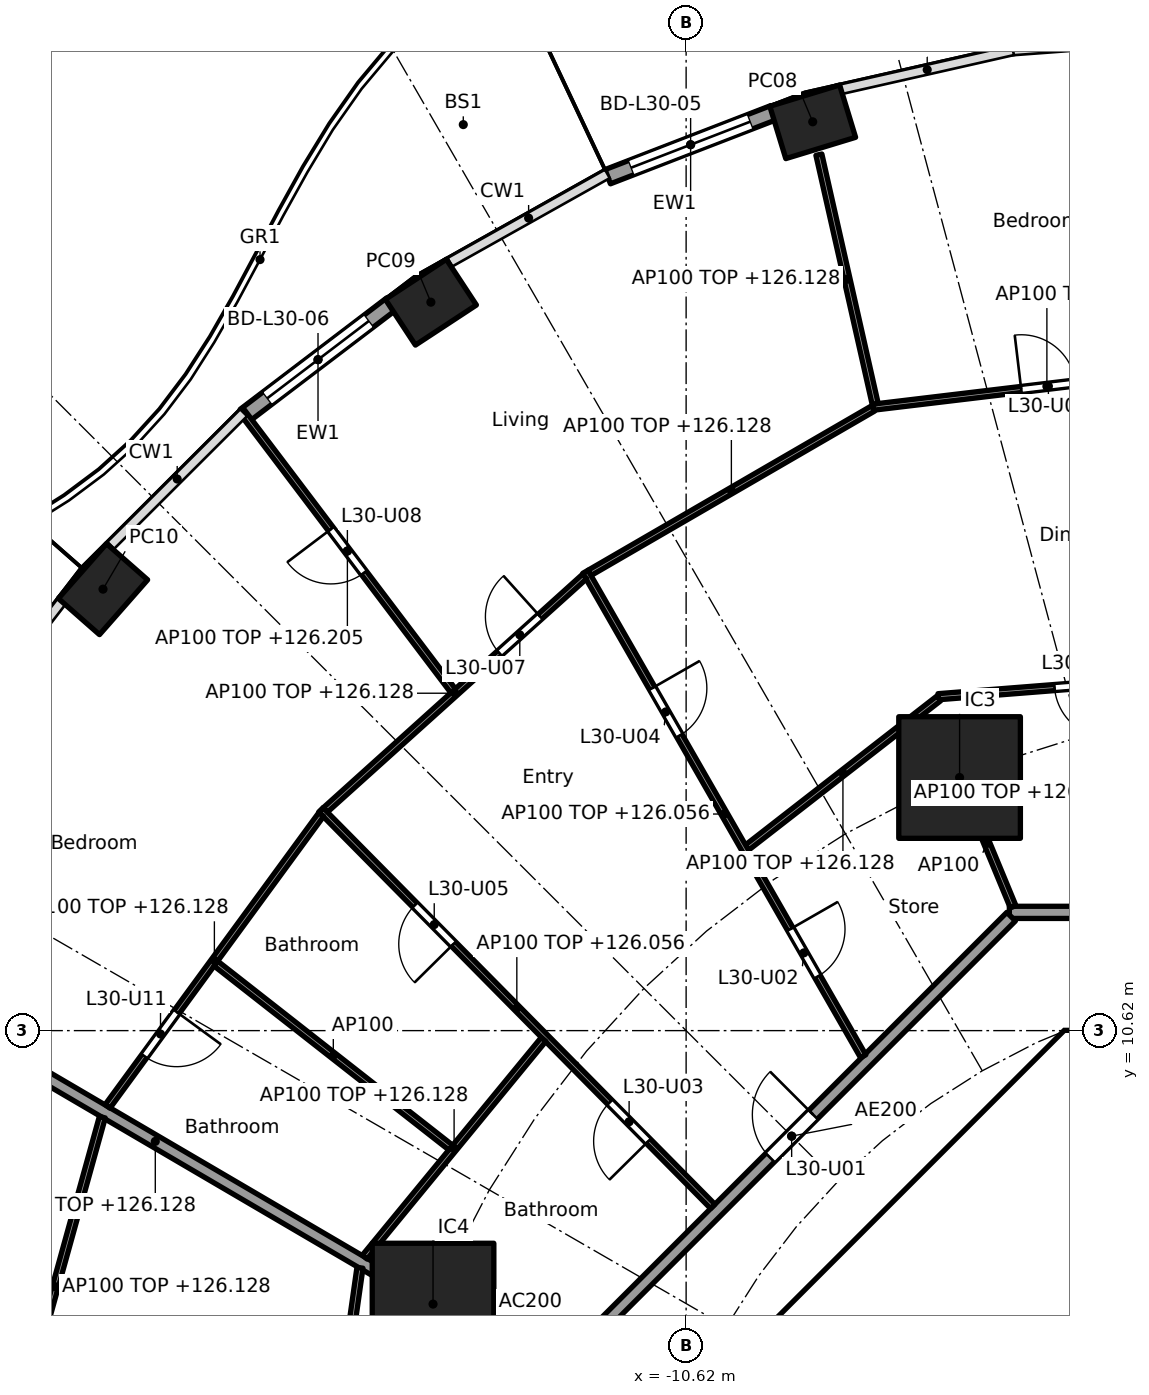
"""IFC4 building model, lengths in metres.
Left out: names, types, materials, properties, quantities, classifications, styles, units other than length and angle.
Written with IfcOpenShell. Run it as: python <this file> out.ifc"""

import sys

from ifc_helpers import new_model, si_unit, direction, frame, frame_2d, origin, origin_2d, place, context, subcontext, project, spatial, polyline, rectangle, hollow_rectangle, outline, extrude, element, fill, save


model = new_model("IFC4")
c1 = context("Model", 3, precision=1e-05, world=origin(), true_north=direction((0.0, 1.0)))
c2 = subcontext(c1, "Body", "Model", "MODEL_VIEW")
j1 = project(units=[si_unit("LENGTHUNIT", "METRE"), si_unit("PLANEANGLEUNIT", "RADIAN")], contexts=[c1])
p1 = place(None, origin())
s1 = spatial("IfcSite", under=j1, at=p1, CompositionType="ELEMENT")
p2 = place(p1, origin())
s2 = spatial("IfcBuilding", under=s1, at=p2, CompositionType="ELEMENT")
p3 = place(p2, frame((0.0, 0.0, 123.3)))
s3 = spatial("IfcBuildingStorey", under=s2, at=p3, CompositionType="ELEMENT", Elevation=123.3)
for number, where, z_axis, x_axis in (
    (1, (-8.538, 25.565, 0.0), (0.0, 0.0, 1.0), (-0.957, -0.292, 0.0)),
    (2, (-14.817, 22.599, 0.0), (0.0, 0.0, 1.0), (-0.836, -0.549, 0.0)),
    (3, (-20.209, 17.88, 0.0), (0.0, 0.0, 1.0), (-0.66, -0.751, 0.0)),
):
    element("IfcColumn", number, at=place(p3, frame(where, z_axis=z_axis, x_axis=x_axis)), inside=s3, PredefinedType="COLUMN", context=c2, shape_type="SweptSolid", body=[
        extrude(hollow_rectangle(XDim=1.2, YDim=0.9, WallThickness=0.04, at=origin_2d()), origin(), (0.0, 0.0, 1.0), 3.7),
    ])
for number, where, z_axis, x_axis in (
    (4, (-6.123, 14.782, 0.0), (0.0, 0.0, 1.0), (1.0, 0.0, 0.0)),
    (5, (-14.782, 6.123, 0.0), (0.0, 0.0, 1.0), (1.0, 0.0, 0.0)),
):
    element("IfcColumn", number, at=place(p3, frame(where, z_axis=z_axis, x_axis=x_axis)), inside=s3, PredefinedType="COLUMN", context=c2, shape_type="SweptSolid", body=[
        extrude(rectangle(XDim=2.0, YDim=2.0, at=origin_2d()), origin(), (0.0, 0.0, 1.0), 3.7),
    ])
p4 = place(p3, frame((-11.909, 24.662, 0.0), z_axis=(0.0, 0.0, 1.0), x_axis=(0.932845344347, 0.360277064952, 0.0)))
e6 = element("IfcWall", 6, at=p4, inside=s3, PredefinedType="SOLIDWALL", context=c2, shape_type="SweptSolid", body=[
    extrude(rectangle(XDim=2.923, YDim=0.25, at=frame_2d((1.462, 0.0))), origin(), (0.0, 0.0, 1.0), 3.44),
])
p5 = place(p4, frame((0.412, 0.0, 0.0)))
e7 = element("IfcOpeningElement", 7, at=p5, cuts=e6, PredefinedType="OPENING", context=c2, shape_type="SweptSolid", body=[
    extrude(rectangle(XDim=2.1, YDim=2.4, at=frame_2d((1.05, 1.2))), frame((0.0, 0.135, 0.0), z_axis=(0.0, -1.0, 0.0), x_axis=(1.0, 0.0, 0.0)), (0.0, 0.0, 1.0), 0.27),
])
p6 = place(p3, frame((-17.878, 20.738, 0.0), z_axis=(0.0, 0.0, 1.0), x_axis=(0.796022231079, 0.605267385233, 0.0)))
e8 = element("IfcWall", 8, at=p6, inside=s3, PredefinedType="SOLIDWALL", context=c2, shape_type="SweptSolid", body=[
    extrude(rectangle(XDim=3.026, YDim=0.25, at=frame_2d((1.513, 0.0))), origin(), (0.0, 0.0, 1.0), 3.44),
])
p7 = place(p6, frame((0.463, 0.0, 0.0)))
e9 = element("IfcOpeningElement", 9, at=p7, cuts=e8, PredefinedType="OPENING", context=c2, shape_type="SweptSolid", body=[
    extrude(rectangle(XDim=2.1, YDim=2.4, at=frame_2d((1.05, 1.2))), frame((0.0, 0.135, 0.0), z_axis=(0.0, -1.0, 0.0), x_axis=(1.0, 0.0, 0.0)), (0.0, 0.0, 1.0), 0.27),
])
p8 = place(p3, frame((-4.613, 9.988, 0.0), z_axis=(0.0, 0.0, 1.0), x_axis=(-0.707106781187, -0.707106781187, 0.0)))
e10 = element("IfcWall", 10, at=p8, inside=s3, PredefinedType="SHEAR", context=c2, shape_type="SweptSolid", body=[
    extrude(rectangle(XDim=7.602, YDim=0.6, at=frame_2d((3.801, 0.0))), origin(), (0.0, 0.0, 1.0), 3.44),
])
p9 = place(p8, frame((0.351, 0.0, 0.0)))
e11 = element("IfcOpeningElement", 11, at=p9, cuts=e10, PredefinedType="OPENING", context=c2, shape_type="SweptSolid", body=[
    extrude(rectangle(XDim=1.1, YDim=2.1, at=frame_2d((0.55, 1.05))), frame((0.0, 0.31, 0.0), z_axis=(0.0, -1.0, 0.0), x_axis=(1.0, 0.0, 0.0)), (0.0, 0.0, 1.0), 0.62),
])
p10 = place(p3, frame((-5.8, 4.3, 0.0), z_axis=(0.0, 0.0, 1.0), x_axis=(0.0, 1.0, 0.0)))
e12 = element("IfcWall", 12, at=p10, inside=s3, PredefinedType="PARTITIONING", context=c2, shape_type="SweptSolid", body=[
    extrude(rectangle(XDim=3.927, YDim=0.15, at=frame_2d((1.963, 0.0))), origin(), (0.0, 0.0, 1.0), 3.44),
])
p11 = place(p10, frame((1.551, 0.0, 0.0)))
e13 = element("IfcOpeningElement", 13, at=p11, cuts=e12, PredefinedType="OPENING", context=c2, shape_type="SweptSolid", body=[
    extrude(rectangle(XDim=0.9, YDim=2.1, at=frame_2d((0.45, 1.05))), frame((0.0, 0.085, 0.0), z_axis=(0.0, -1.0, 0.0), x_axis=(1.0, 0.0, 0.0)), (0.0, 0.0, 1.0), 0.17),
])
p12 = place(p3, origin())
e14 = element("IfcWall", 14, at=p12, inside=s3, PredefinedType="SHEAR", context=c2, shape_type="SweptSolid", body=[
    extrude(outline(polyline([(-4.152, 10.025), (-4.401, 9.776), (-4.825, 10.2), (-4.401, 10.625), (4.401, 10.625), (4.825, 10.2), (4.401, 9.776), (4.152, 10.025), (-4.152, 10.025)])), origin(), (0.0, 0.0, 1.0), 3.44),
])
p13 = place(p3, frame((-12.657, 5.243, 0.0), z_axis=(0.0, 0.0, 1.0), x_axis=(-0.923869415315, 0.382707856524, 0.0)))
e15 = element("IfcWall", 15, at=p13, inside=s3, PredefinedType="PARTITIONING", context=c2, shape_type="SweptSolid", body=[
    extrude(rectangle(XDim=2.2, YDim=0.2, at=frame_2d((1.1, 0.0))), origin(), (0.0, 0.0, 1.0), 3.44),
])
p14 = place(p3, frame((-14.825, 6.148, 0.0), z_axis=(0.0, 0.0, 1.0), x_axis=(-0.862852031662, 0.505456597006, 0.0)))
e16 = element("IfcWall", 16, at=p14, inside=s3, PredefinedType="PARTITIONING", context=c2, shape_type="SweptSolid", body=[
    extrude(rectangle(XDim=10.487, YDim=0.2, at=frame_2d((5.244, 0.0))), origin(), (0.0, 0.0, 1.0), 2.828),
])
p15 = place(p3, frame((5.104, 12.565, 0.0), z_axis=(0.0, 0.0, 1.0), x_axis=(-1.0, 0.0, 0.0)))
e17 = element("IfcWall", 17, at=p15, inside=s3, PredefinedType="PARTITIONING", context=c2, shape_type="SweptSolid", body=[
    extrude(rectangle(XDim=10.409, YDim=0.2, at=frame_2d((5.205, 0.0))), origin(), (0.0, 0.0, 1.0), 3.44),
])
p16 = place(p3, frame((-5.275, 12.494, 0.0), z_axis=(0.0, 0.0, 1.0), x_axis=(-0.707106781187, -0.707106781187, 0.0)))
e18 = element("IfcWall", 18, at=p16, inside=s3, PredefinedType="PARTITIONING", context=c2, shape_type="SweptSolid", body=[
    extrude(rectangle(XDim=10.209, YDim=0.2, at=frame_2d((5.104, 0.0))), origin(), (0.0, 0.0, 1.0), 3.44),
])
p17 = place(p16, frame((4.604, 0.0, 0.0)))
e19 = element("IfcOpeningElement", 19, at=p17, cuts=e18, PredefinedType="OPENING", context=c2, shape_type="SweptSolid", body=[
    extrude(rectangle(XDim=1.0, YDim=2.1, at=frame_2d((0.5, 1.05))), frame((0.0, 0.11, 0.0), z_axis=(0.0, -1.0, 0.0), x_axis=(1.0, 0.0, 0.0)), (0.0, 0.0, 1.0), 0.22),
])
p18 = place(p3, frame((-1.802, 16.479, 0.0), z_axis=(0.0, 0.0, 1.0), x_axis=(-0.996909003513, -0.078564869469, 0.0)))
e20 = element("IfcWall", 20, at=p18, inside=s3, PredefinedType="PARTITIONING", context=c2, shape_type="SweptSolid", body=[
    extrude(rectangle(XDim=4.686, YDim=0.1, at=frame_2d((2.343, 0.0))), origin(), (0.0, 0.0, 1.0), 2.828),
])
p19 = place(p18, frame((1.868, 0.0, 0.0)))
e21 = element("IfcOpeningElement", 21, at=p19, cuts=e20, PredefinedType="OPENING", context=c2, shape_type="SweptSolid", body=[
    extrude(rectangle(XDim=0.9, YDim=2.1, at=frame_2d((0.45, 1.05))), frame((0.0, 0.06, 0.0), z_axis=(0.0, -1.0, 0.0), x_axis=(1.0, 0.0, 0.0)), (0.0, 0.0, 1.0), 0.12),
])
p20 = place(p3, frame((-1.825, 21.557, 0.0), z_axis=(0.0, 0.0, 1.0), x_axis=(-0.992915657947, -0.118821278412, 0.0)))
e22 = element("IfcWall", 22, at=p20, inside=s3, PredefinedType="PARTITIONING", context=c2, shape_type="SweptSolid", body=[
    extrude(rectangle(XDim=5.765, YDim=0.1, at=frame_2d((2.883, 0.0))), origin(), (0.0, 0.0, 1.0), 2.828),
])
p21 = place(p20, frame((2.408, 0.0, 0.0)))
e23 = element("IfcOpeningElement", 23, at=p21, cuts=e22, PredefinedType="OPENING", context=c2, shape_type="SweptSolid", body=[
    extrude(rectangle(XDim=0.9, YDim=2.1, at=frame_2d((0.45, 1.05))), frame((0.0, 0.06, 0.0), z_axis=(0.0, -1.0, 0.0), x_axis=(1.0, 0.0, 0.0)), (0.0, 0.0, 1.0), 0.12),
])
p22 = place(p3, frame((-5.243, 12.657, 0.0), z_axis=(0.0, 0.0, 1.0), x_axis=(-0.382719158442, 0.923864733477, 0.0)))
e24 = element("IfcWall", 24, at=p22, inside=s3, PredefinedType="PARTITIONING", context=c2, shape_type="SweptSolid", body=[
    extrude(rectangle(XDim=2.25, YDim=0.1, at=frame_2d((1.125, 0.0))), origin(), (0.0, 0.0, 1.0), 3.44),
])
p23 = place(p3, frame((-6.463, 16.084, 0.0), z_axis=(0.0, 0.0, 1.0), x_axis=(-0.789457442969, -0.613805299538, 0.0)))
e25 = element("IfcWall", 25, at=p23, inside=s3, PredefinedType="PARTITIONING", context=c2, shape_type="SweptSolid", body=[
    extrude(rectangle(XDim=3.997, YDim=0.1, at=frame_2d((1.999, 0.0))), origin(), (0.0, 0.0, 1.0), 2.828),
])
p24 = place(p3, frame((-7.511, 20.927, 0.0), z_axis=(0.0, 0.0, 1.0), x_axis=(-0.220337559031, 0.975423682345, 0.0)))
e26 = element("IfcWall", 26, at=p24, inside=s3, PredefinedType="PARTITIONING", context=c2, shape_type="SweptSolid", body=[
    extrude(rectangle(XDim=4.202, YDim=0.1, at=frame_2d((2.101, 0.0))), origin(), (0.0, 0.0, 1.0), 2.828),
])
p25 = place(p3, frame((-7.543, 20.853, 0.0), z_axis=(0.0, 0.0, 1.0), x_axis=(-0.865086194899, -0.501623240485, 0.0)))
e27 = element("IfcWall", 27, at=p25, inside=s3, PredefinedType="PARTITIONING", context=c2, shape_type="SweptSolid", body=[
    extrude(rectangle(XDim=5.393, YDim=0.1, at=frame_2d((2.697, 0.0))), origin(), (0.0, 0.0, 1.0), 2.828),
])
p26 = place(p3, frame((-7.708, 10.198, 0.0), z_axis=(0.0, 0.0, 1.0), x_axis=(-0.497449462689, 0.867492957937, 0.0)))
e28 = element("IfcWall", 28, at=p26, inside=s3, PredefinedType="PARTITIONING", context=c2, shape_type="SweptSolid", body=[
    extrude(rectangle(XDim=9.185, YDim=0.1, at=frame_2d((4.592, 0.0))), origin(), (0.0, 0.0, 1.0), 2.756),
])
p27 = place(p26, frame((1.511, 0.0, 0.0)))
e29 = element("IfcOpeningElement", 29, at=p27, cuts=e28, PredefinedType="OPENING", context=c2, shape_type="SweptSolid", body=[
    extrude(rectangle(XDim=0.9, YDim=2.1, at=frame_2d((0.45, 1.05))), frame((0.0, 0.06, 0.0), z_axis=(0.0, -1.0, 0.0), x_axis=(1.0, 0.0, 0.0)), (0.0, 0.0, 1.0), 0.12),
])
p28 = place(p26, frame((6.078, 0.0, 0.0)))
e30 = element("IfcOpeningElement", 30, at=p28, cuts=e28, PredefinedType="OPENING", context=c2, shape_type="SweptSolid", body=[
    extrude(rectangle(XDim=0.9, YDim=2.1, at=frame_2d((0.45, 1.05))), frame((0.0, 0.06, 0.0), z_axis=(0.0, -1.0, 0.0), x_axis=(1.0, 0.0, 0.0)), (0.0, 0.0, 1.0), 0.12),
])
p29 = place(p3, frame((-12.289, 18.089, 0.0), z_axis=(0.0, 0.0, 1.0), x_axis=(-0.743146066164, -0.669129228435, 0.0)))
e31 = element("IfcWall", 31, at=p29, inside=s3, PredefinedType="PARTITIONING", context=c2, shape_type="SweptSolid", body=[
    extrude(rectangle(XDim=5.739, YDim=0.1, at=frame_2d((2.87, 0.0))), origin(), (0.0, 0.0, 1.0), 2.828),
])
p30 = place(p29, frame((0.985, 0.0, 0.0)))
e32 = element("IfcOpeningElement", 32, at=p30, cuts=e31, PredefinedType="OPENING", context=c2, shape_type="SweptSolid", body=[
    extrude(rectangle(XDim=0.9, YDim=2.1, at=frame_2d((0.45, 1.05))), frame((0.0, 0.06, 0.0), z_axis=(0.0, -1.0, 0.0), x_axis=(1.0, 0.0, 0.0)), (0.0, 0.0, 1.0), 0.12),
])
p31 = place(p3, frame((-14.452, 16.208, 0.0), z_axis=(0.0, 0.0, 1.0), x_axis=(-0.603267974074, 0.797538557975, 0.0)))
e33 = element("IfcWall", 33, at=p31, inside=s3, PredefinedType="PARTITIONING", context=c2, shape_type="SweptSolid", body=[
    extrude(rectangle(XDim=5.764, YDim=0.1, at=frame_2d((2.882, 0.0))), origin(), (0.0, 0.0, 1.0), 2.905),
])
p32 = place(p31, frame((2.432, 0.0, 0.0)))
e34 = element("IfcOpeningElement", 34, at=p32, cuts=e33, PredefinedType="OPENING", context=c2, shape_type="SweptSolid", body=[
    extrude(rectangle(XDim=0.9, YDim=2.1, at=frame_2d((0.45, 1.05))), frame((0.0, 0.06, 0.0), z_axis=(0.0, -1.0, 0.0), x_axis=(1.0, 0.0, 0.0)), (0.0, 0.0, 1.0), 0.12),
])
p33 = place(p3, frame((-10.182, 7.729, 0.0), z_axis=(0.0, 0.0, 1.0), x_axis=(-0.702927211734, 0.711261790766, 0.0)))
e35 = element("IfcWall", 35, at=p33, inside=s3, PredefinedType="PARTITIONING", context=c2, shape_type="SweptSolid", body=[
    extrude(rectangle(XDim=9.168, YDim=0.1, at=frame_2d((4.584, 0.0))), origin(), (0.0, 0.0, 1.0), 2.756),
])
p34 = place(p33, frame((1.507, 0.0, 0.0)))
e36 = element("IfcOpeningElement", 36, at=p34, cuts=e35, PredefinedType="OPENING", context=c2, shape_type="SweptSolid", body=[
    extrude(rectangle(XDim=0.9, YDim=2.1, at=frame_2d((0.45, 1.05))), frame((0.0, 0.06, 0.0), z_axis=(0.0, -1.0, 0.0), x_axis=(1.0, 0.0, 0.0)), (0.0, 0.0, 1.0), 0.12),
])
p35 = place(p33, frame((6.067, 0.0, 0.0)))
e37 = element("IfcOpeningElement", 37, at=p35, cuts=e35, PredefinedType="OPENING", context=c2, shape_type="SweptSolid", body=[
    extrude(rectangle(XDim=0.9, YDim=2.1, at=frame_2d((0.45, 1.05))), frame((0.0, 0.06, 0.0), z_axis=(0.0, -1.0, 0.0), x_axis=(1.0, 0.0, 0.0)), (0.0, 0.0, 1.0), 0.12),
])
p36 = place(p3, frame((-12.965, 10.475, 0.0), z_axis=(0.0, 0.0, 1.0), x_axis=(-0.634943961338, -0.772558195841, 0.0)))
e38 = element("IfcWall", 38, at=p36, inside=s3, PredefinedType="PARTITIONING", context=c2, shape_type="SweptSolid", body=[
    extrude(rectangle(XDim=4.632, YDim=0.1, at=frame_2d((2.316, 0.0))), origin(), (0.0, 0.0, 1.0), 2.828),
])
p37 = place(p3, frame((-16.621, 14.174, 0.0), z_axis=(0.0, 0.0, 1.0), x_axis=(-0.590674917338, -0.806909624449, 0.0)))
e39 = element("IfcWall", 39, at=p37, inside=s3, PredefinedType="PARTITIONING", context=c2, shape_type="SweptSolid", body=[
    extrude(rectangle(XDim=5.949, YDim=0.1, at=frame_2d((2.975, 0.0))), origin(), (0.0, 0.0, 1.0), 2.828),
])
p38 = place(p37, frame((4.024, 0.0, 0.0)))
e40 = element("IfcOpeningElement", 40, at=p38, cuts=e39, PredefinedType="OPENING", context=c2, shape_type="SweptSolid", body=[
    extrude(rectangle(XDim=0.9, YDim=2.1, at=frame_2d((0.45, 1.05))), frame((0.0, 0.06, 0.0), z_axis=(0.0, -1.0, 0.0), x_axis=(1.0, 0.0, 0.0)), (0.0, 0.0, 1.0), 0.12),
])
p39 = place(p3, frame((-14.491, 8.697, 0.0), z_axis=(0.0, 0.0, 1.0), x_axis=(-0.787139479951, 0.616775031193, 0.0)))
e41 = element("IfcWall", 41, at=p39, inside=s3, PredefinedType="PARTITIONING", context=c2, shape_type="SweptSolid", body=[
    extrude(rectangle(XDim=4.907, YDim=0.1, at=frame_2d((2.453, 0.0))), origin(), (0.0, 0.0, 1.0), 3.44),
])
p40 = place(p3, frame((-15.984, 6.72, 0.0), z_axis=(0.0, 0.0, 1.0), x_axis=(-0.140684869512, -0.990054426529, 0.0)))
e42 = element("IfcWall", 42, at=p40, inside=s3, PredefinedType="PARTITIONING", context=c2, shape_type="SweptSolid", body=[
    extrude(rectangle(XDim=4.177, YDim=0.1, at=frame_2d((2.088, 0.0))), origin(), (0.0, 0.0, 1.0), 2.828),
])
p41 = place(p40, frame((1.638, 0.0, 0.0)))
e43 = element("IfcOpeningElement", 43, at=p41, cuts=e42, PredefinedType="OPENING", context=c2, shape_type="SweptSolid", body=[
    extrude(rectangle(XDim=0.9, YDim=2.1, at=frame_2d((0.45, 1.05))), frame((0.0, 0.06, 0.0), z_axis=(0.0, -1.0, 0.0), x_axis=(1.0, 0.0, 0.0)), (0.0, 0.0, 1.0), 0.12),
])
p42 = place(p3, frame((-20.221, 9.197, 0.0), z_axis=(0.0, 0.0, 1.0), x_axis=(-0.267398009191, -0.963586168789, 0.0)))
e44 = element("IfcWall", 44, at=p42, inside=s3, PredefinedType="PARTITIONING", context=c2, shape_type="SweptSolid", body=[
    extrude(rectangle(XDim=5.788, YDim=0.1, at=frame_2d((2.894, 0.0))), origin(), (0.0, 0.0, 1.0), 2.828),
])
p43 = place(p5, origin())
e45 = element("IfcDoor", 45, at=p43, inside=s3, OperationType="SLIDING_TO_LEFT", PredefinedType="DOOR", context=c2, shape_type="SweptSolid", body=[
    extrude(rectangle(XDim=2.1, YDim=2.4, at=frame_2d((1.05, 1.2))), frame((0.0, 0.025, 0.0), z_axis=(0.0, -1.0, 0.0), x_axis=(1.0, 0.0, 0.0)), (0.0, 0.0, 1.0), 0.05),
])
fill(e7, e45)
p44 = place(p7, origin())
e46 = element("IfcDoor", 46, at=p44, inside=s3, OperationType="SLIDING_TO_LEFT", PredefinedType="DOOR", context=c2, shape_type="SweptSolid", body=[
    extrude(rectangle(XDim=2.1, YDim=2.4, at=frame_2d((1.05, 1.2))), frame((0.0, 0.025, 0.0), z_axis=(0.0, -1.0, 0.0), x_axis=(1.0, 0.0, 0.0)), (0.0, 0.0, 1.0), 0.05),
])
fill(e9, e46)
p45 = place(p11, origin())
e47 = element("IfcDoor", 47, at=p45, inside=s3, OperationType="SINGLE_SWING_LEFT", PredefinedType="DOOR", context=c2, shape_type="SweptSolid", body=[
    extrude(rectangle(XDim=0.9, YDim=2.1, at=frame_2d((0.45, 1.05))), frame((0.0, 0.025, 0.0), z_axis=(0.0, -1.0, 0.0), x_axis=(1.0, 0.0, 0.0)), (0.0, 0.0, 1.0), 0.05),
])
fill(e13, e47)
p46 = place(p9, origin())
e48 = element("IfcDoor", 48, at=p46, inside=s3, OperationType="SINGLE_SWING_RIGHT", PredefinedType="DOOR", context=c2, shape_type="SweptSolid", body=[
    extrude(rectangle(XDim=1.1, YDim=2.1, at=frame_2d((0.55, 1.05))), frame((0.0, 0.025, 0.0), z_axis=(0.0, -1.0, 0.0), x_axis=(1.0, 0.0, 0.0)), (0.0, 0.0, 1.0), 0.05),
])
fill(e11, e48)
p47 = place(p17, frame((1.0, 0.0, 0.0), x_axis=(-1.0, 0.0, 0.0)))
e49 = element("IfcDoor", 49, at=p47, inside=s3, OperationType="SINGLE_SWING_RIGHT", PredefinedType="DOOR", context=c2, shape_type="SweptSolid", body=[
    extrude(rectangle(XDim=1.0, YDim=2.1, at=frame_2d((0.5, 1.05))), frame((0.0, 0.025, 0.0), z_axis=(0.0, -1.0, 0.0), x_axis=(1.0, 0.0, 0.0)), (0.0, 0.0, 1.0), 0.05),
])
fill(e19, e49)
p48 = place(p27, frame((0.9, 0.0, 0.0), x_axis=(-1.0, 0.0, 0.0)))
e50 = element("IfcDoor", 50, at=p48, inside=s3, OperationType="SINGLE_SWING_LEFT", PredefinedType="DOOR", context=c2, shape_type="SweptSolid", body=[
    extrude(rectangle(XDim=0.9, YDim=2.1, at=frame_2d((0.45, 1.05))), frame((0.0, 0.025, 0.0), z_axis=(0.0, -1.0, 0.0), x_axis=(1.0, 0.0, 0.0)), (0.0, 0.0, 1.0), 0.05),
])
fill(e29, e50)
p49 = place(p34, origin())
e51 = element("IfcDoor", 51, at=p49, inside=s3, OperationType="SINGLE_SWING_LEFT", PredefinedType="DOOR", context=c2, shape_type="SweptSolid", body=[
    extrude(rectangle(XDim=0.9, YDim=2.1, at=frame_2d((0.45, 1.05))), frame((0.0, 0.025, 0.0), z_axis=(0.0, -1.0, 0.0), x_axis=(1.0, 0.0, 0.0)), (0.0, 0.0, 1.0), 0.05),
])
fill(e36, e51)
p50 = place(p28, frame((0.9, 0.0, 0.0), x_axis=(-1.0, 0.0, 0.0)))
e52 = element("IfcDoor", 52, at=p50, inside=s3, OperationType="SINGLE_SWING_LEFT", PredefinedType="DOOR", context=c2, shape_type="SweptSolid", body=[
    extrude(rectangle(XDim=0.9, YDim=2.1, at=frame_2d((0.45, 1.05))), frame((0.0, 0.025, 0.0), z_axis=(0.0, -1.0, 0.0), x_axis=(1.0, 0.0, 0.0)), (0.0, 0.0, 1.0), 0.05),
])
fill(e30, e52)
p51 = place(p35, origin())
e53 = element("IfcDoor", 53, at=p51, inside=s3, OperationType="SINGLE_SWING_LEFT", PredefinedType="DOOR", context=c2, shape_type="SweptSolid", body=[
    extrude(rectangle(XDim=0.9, YDim=2.1, at=frame_2d((0.45, 1.05))), frame((0.0, 0.025, 0.0), z_axis=(0.0, -1.0, 0.0), x_axis=(1.0, 0.0, 0.0)), (0.0, 0.0, 1.0), 0.05),
])
fill(e37, e53)
p52 = place(p21, frame((0.9, 0.0, 0.0), x_axis=(-1.0, 0.0, 0.0)))
e54 = element("IfcDoor", 54, at=p52, inside=s3, OperationType="SINGLE_SWING_LEFT", PredefinedType="DOOR", context=c2, shape_type="SweptSolid", body=[
    extrude(rectangle(XDim=0.9, YDim=2.1, at=frame_2d((0.45, 1.05))), frame((0.0, 0.025, 0.0), z_axis=(0.0, -1.0, 0.0), x_axis=(1.0, 0.0, 0.0)), (0.0, 0.0, 1.0), 0.05),
])
fill(e23, e54)
p53 = place(p30, frame((0.9, 0.0, 0.0), x_axis=(-1.0, 0.0, 0.0)))
e55 = element("IfcDoor", 55, at=p53, inside=s3, OperationType="SINGLE_SWING_RIGHT", PredefinedType="DOOR", context=c2, shape_type="SweptSolid", body=[
    extrude(rectangle(XDim=0.9, YDim=2.1, at=frame_2d((0.45, 1.05))), frame((0.0, 0.025, 0.0), z_axis=(0.0, -1.0, 0.0), x_axis=(1.0, 0.0, 0.0)), (0.0, 0.0, 1.0), 0.05),
])
fill(e32, e55)
p54 = place(p32, origin())
e56 = element("IfcDoor", 56, at=p54, inside=s3, OperationType="SINGLE_SWING_RIGHT", PredefinedType="DOOR", context=c2, shape_type="SweptSolid", body=[
    extrude(rectangle(XDim=0.9, YDim=2.1, at=frame_2d((0.45, 1.05))), frame((0.0, 0.025, 0.0), z_axis=(0.0, -1.0, 0.0), x_axis=(1.0, 0.0, 0.0)), (0.0, 0.0, 1.0), 0.05),
])
fill(e34, e56)
p55 = place(p19, origin())
e57 = element("IfcDoor", 57, at=p55, inside=s3, OperationType="SINGLE_SWING_LEFT", PredefinedType="DOOR", context=c2, shape_type="SweptSolid", body=[
    extrude(rectangle(XDim=0.9, YDim=2.1, at=frame_2d((0.45, 1.05))), frame((0.0, 0.025, 0.0), z_axis=(0.0, -1.0, 0.0), x_axis=(1.0, 0.0, 0.0)), (0.0, 0.0, 1.0), 0.05),
])
fill(e21, e57)
p56 = place(p38, origin())
e58 = element("IfcDoor", 58, at=p56, inside=s3, OperationType="SINGLE_SWING_LEFT", PredefinedType="DOOR", context=c2, shape_type="SweptSolid", body=[
    extrude(rectangle(XDim=0.9, YDim=2.1, at=frame_2d((0.45, 1.05))), frame((0.0, 0.025, 0.0), z_axis=(0.0, -1.0, 0.0), x_axis=(1.0, 0.0, 0.0)), (0.0, 0.0, 1.0), 0.05),
])
fill(e40, e58)
save(model, sys.argv[1])
